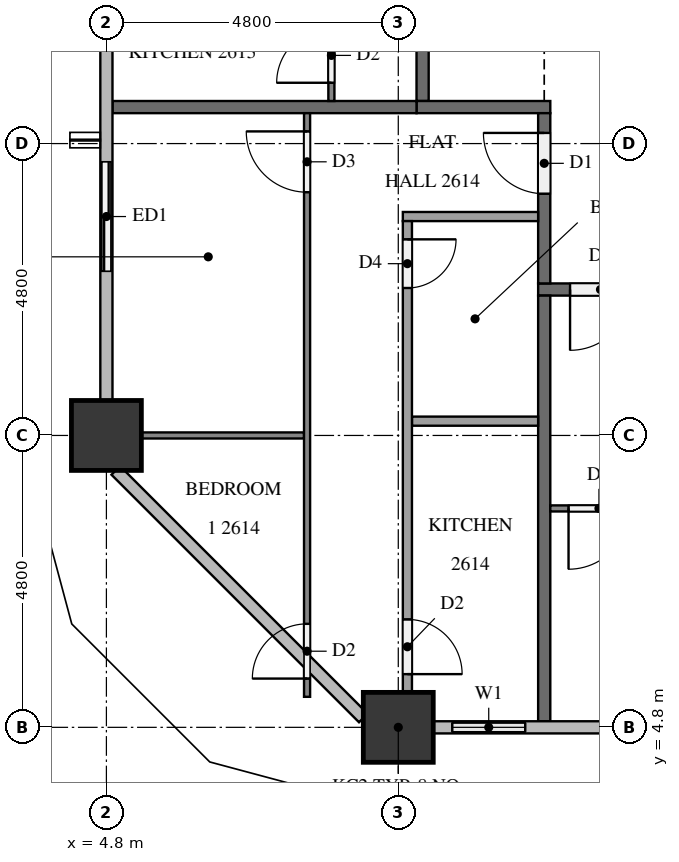
"""IFC4 building model, lengths in metres.
Left out: names, types, materials, properties, quantities, classifications, styles, units other than length and angle.
Written with IfcOpenShell. Run it as: python <this file> out.ifc"""

import sys

from ifc_helpers import new_model, si_unit, direction, frame, frame_2d, origin, origin_2d, place, context, subcontext, project, spatial, rectangle, extrude, element, fill, save


model = new_model("IFC4")
c1 = context("Model", 3, precision=1e-05, world=origin(), true_north=direction((0.0, 1.0)))
c2 = subcontext(c1, "Body", "Model", "MODEL_VIEW")
j1 = project(units=[si_unit("LENGTHUNIT", "METRE"), si_unit("PLANEANGLEUNIT", "RADIAN")], contexts=[c1])
p1 = place(None, origin())
s1 = spatial("IfcSite", under=j1, at=p1, CompositionType="ELEMENT")
p2 = place(p1, origin())
s2 = spatial("IfcBuilding", under=s1, at=p2, CompositionType="ELEMENT")
p3 = place(p2, frame((0.0, 0.0, 103.2)))
s3 = spatial("IfcBuildingStorey", under=s2, at=p3, CompositionType="ELEMENT", Elevation=103.2)
for number, where, z_axis, x_axis in (
    (1, (9.6, 4.8, 0.0), (0.0, 0.0, 1.0), (1.0, 0.0, 0.0)),
    (2, (4.8, 9.6, 0.0), (0.0, 0.0, 1.0), (1.0, 0.0, 0.0)),
):
    element("IfcColumn", number, at=place(p3, frame(where, z_axis=z_axis, x_axis=x_axis)), inside=s3, PredefinedType="COLUMN", context=c2, shape_type="SweptSolid", body=[
        extrude(rectangle(XDim=1.15, YDim=1.15, at=origin_2d()), origin(), (0.0, 0.0, 1.0), 3.2),
    ])
p4 = place(p3, frame((10.175, 4.8, 0.0), z_axis=(0.0, 0.0, 1.0), x_axis=(1.0, 0.0, 0.0)))
e3 = element("IfcWall", 3, at=p4, inside=s3, PredefinedType="SOLIDWALL", context=c2, shape_type="SweptSolid", body=[
    extrude(rectangle(XDim=1.825, YDim=0.15, at=frame_2d((0.913, 0.0))), origin(), (0.0, 0.0, 1.0), 3.2),
])
p5 = place(p4, frame((0.312, 0.0, 0.9)))
e4 = element("IfcOpeningElement", 4, at=p5, cuts=e3, PredefinedType="OPENING", context=c2, shape_type="SweptSolid", body=[
    extrude(rectangle(XDim=1.2, YDim=1.4, at=frame_2d((0.6, 0.7))), frame((0.0, 0.085, 0.0), z_axis=(0.0, -1.0, 0.0), x_axis=(1.0, 0.0, 0.0)), (0.0, 0.0, 1.0), 0.17),
])
p6 = place(p3, frame((4.8, 14.4, 0.0), z_axis=(0.0, 0.0, 1.0), x_axis=(0.0, -1.0, 0.0)))
e5 = element("IfcWall", 5, at=p6, inside=s3, PredefinedType="SOLIDWALL", context=c2, shape_type="SweptSolid", body=[
    extrude(rectangle(XDim=2.4, YDim=0.15, at=frame_2d((1.2, 0.0))), origin(), (0.0, 0.0, 1.0), 3.2),
])
p7 = place(p6, frame((0.3, 0.0, 0.0)))
e6 = element("IfcOpeningElement", 6, at=p7, cuts=e5, PredefinedType="OPENING", context=c2, shape_type="SweptSolid", body=[
    extrude(rectangle(XDim=1.8, YDim=2.4, at=frame_2d((0.9, 1.2))), frame((0.0, 0.085, 0.0), z_axis=(0.0, -1.0, 0.0), x_axis=(1.0, 0.0, 0.0)), (0.0, 0.0, 1.0), 0.17),
])
p8 = place(p3, frame((50.5, 12.0, 0.0), z_axis=(0.0, 0.0, 1.0), x_axis=(-1.0, 0.0, 0.0)))
e7 = element("IfcWall", 7, at=p8, inside=s3, PredefinedType="PARTITIONING", context=c2, shape_type="SweptSolid", body=[
    extrude(rectangle(XDim=38.6, YDim=0.2, at=frame_2d((19.3, 0.0))), origin(), (0.0, 0.0, 1.0), 3.2),
])
p9 = place(p8, frame((37.075, 0.0, 0.0)))
e8 = element("IfcOpeningElement", 8, at=p9, cuts=e7, PredefinedType="OPENING", context=c2, shape_type="SweptSolid", body=[
    extrude(rectangle(XDim=1.0, YDim=2.1, at=frame_2d((0.5, 1.05))), frame((0.0, 0.11, 0.0), z_axis=(0.0, -1.0, 0.0), x_axis=(1.0, 0.0, 0.0)), (0.0, 0.0, 1.0), 0.22),
])
p10 = place(p8, frame((22.675, 0.0, 0.0)))
e9 = element("IfcOpeningElement", 9, at=p10, cuts=e7, PredefinedType="OPENING", context=c2, shape_type="SweptSolid", body=[
    extrude(rectangle(XDim=1.0, YDim=2.1, at=frame_2d((0.5, 1.05))), frame((0.0, 0.11, 0.0), z_axis=(0.0, -1.0, 0.0), x_axis=(1.0, 0.0, 0.0)), (0.0, 0.0, 1.0), 0.22),
])
p11 = place(p8, frame((0.525, 0.0, 0.0)))
e10 = element("IfcOpeningElement", 10, at=p11, cuts=e7, PredefinedType="OPENING", context=c2, shape_type="SweptSolid", body=[
    extrude(rectangle(XDim=1.0, YDim=2.1, at=frame_2d((0.5, 1.05))), frame((0.0, 0.11, 0.0), z_axis=(0.0, -1.0, 0.0), x_axis=(1.0, 0.0, 0.0)), (0.0, 0.0, 1.0), 0.22),
])
p12 = place(p3, frame((10.0, 15.1, 0.0), z_axis=(0.0, 0.0, 1.0), x_axis=(0.0, 1.0, 0.0)))
e11 = element("IfcWall", 11, at=p12, inside=s3, PredefinedType="PARTITIONING", context=c2, shape_type="SweptSolid", body=[
    extrude(rectangle(XDim=22.6, YDim=0.2, at=frame_2d((11.3, 0.0))), origin(), (0.0, 0.0, 1.0), 3.2),
])
p13 = place(p12, frame((21.275, 0.0, 0.0)))
e12 = element("IfcOpeningElement", 12, at=p13, cuts=e11, PredefinedType="OPENING", context=c2, shape_type="SweptSolid", body=[
    extrude(rectangle(XDim=1.0, YDim=2.1, at=frame_2d((0.5, 1.05))), frame((0.0, 0.11, 0.0), z_axis=(0.0, -1.0, 0.0), x_axis=(1.0, 0.0, 0.0)), (0.0, 0.0, 1.0), 0.22),
])
p14 = place(p12, frame((7.475, 0.0, 0.0)))
e13 = element("IfcOpeningElement", 13, at=p14, cuts=e11, PredefinedType="OPENING", context=c2, shape_type="SweptSolid", body=[
    extrude(rectangle(XDim=1.0, YDim=2.1, at=frame_2d((0.5, 1.05))), frame((0.0, 0.11, 0.0), z_axis=(0.0, -1.0, 0.0), x_axis=(1.0, 0.0, 0.0)), (0.0, 0.0, 1.0), 0.22),
])
p15 = place(p3, frame((9.9, 15.0, 0.0), z_axis=(0.0, 0.0, 1.0), x_axis=(1.0, 0.0, 0.0)))
e14 = element("IfcWall", 14, at=p15, inside=s3, PredefinedType="PARTITIONING", context=c2, shape_type="SweptSolid", body=[
    extrude(rectangle(XDim=2.2, YDim=0.2, at=frame_2d((1.1, 0.0))), origin(), (0.0, 0.0, 1.0), 3.2),
])
p16 = place(p3, frame((12.0, 12.1, 0.0), z_axis=(0.0, 0.0, 1.0), x_axis=(0.0, 1.0, 0.0)))
e15 = element("IfcWall", 15, at=p16, inside=s3, PredefinedType="PARTITIONING", context=c2, shape_type="SweptSolid", body=[
    extrude(rectangle(XDim=2.8, YDim=0.2, at=frame_2d((1.4, 0.0))), origin(), (0.0, 0.0, 1.0), 3.2),
])
p17 = place(p16, frame((1.475, 0.0, 0.0)))
e16 = element("IfcOpeningElement", 16, at=p17, cuts=e15, PredefinedType="OPENING", context=c2, shape_type="SweptSolid", body=[
    extrude(rectangle(XDim=1.0, YDim=2.1, at=frame_2d((0.5, 1.05))), frame((0.0, 0.11, 0.0), z_axis=(0.0, -1.0, 0.0), x_axis=(1.0, 0.0, 0.0)), (0.0, 0.0, 1.0), 0.22),
])
p18 = place(p3, frame((12.0, 4.9, 0.0), z_axis=(0.0, 0.0, 1.0), x_axis=(0.0, 1.0, 0.0)))
e17 = element("IfcWall", 17, at=p18, inside=s3, PredefinedType="PARTITIONING", context=c2, shape_type="SweptSolid", body=[
    extrude(rectangle(XDim=7.0, YDim=0.2, at=frame_2d((3.5, 0.0))), origin(), (0.0, 0.0, 1.0), 3.2),
])
p19 = place(p3, frame((4.9, 15.0, 0.0), z_axis=(0.0, 0.0, 1.0), x_axis=(1.0, 0.0, 0.0)))
e18 = element("IfcWall", 18, at=p19, inside=s3, PredefinedType="PARTITIONING", context=c2, shape_type="SweptSolid", body=[
    extrude(rectangle(XDim=5.0, YDim=0.2, at=frame_2d((2.5, 0.0))), origin(), (0.0, 0.0, 1.0), 3.2),
])
p20 = place(p3, frame((26.3, 8.4, 0.0), z_axis=(0.0, 0.0, 1.0), x_axis=(-1.0, 0.0, 0.0)))
e19 = element("IfcWall", 19, at=p20, inside=s3, PredefinedType="PARTITIONING", context=c2, shape_type="SweptSolid", body=[
    extrude(rectangle(XDim=14.2, YDim=0.1, at=frame_2d((7.1, 0.0))), origin(), (0.0, 0.0, 1.0), 3.2),
])
p21 = place(p20, frame((12.9, 0.0, 0.0)))
e20 = element("IfcOpeningElement", 20, at=p21, cuts=e19, PredefinedType="OPENING", context=c2, shape_type="SweptSolid", body=[
    extrude(rectangle(XDim=1.0, YDim=2.1, at=frame_2d((0.5, 1.05))), frame((0.0, 0.06, 0.0), z_axis=(0.0, -1.0, 0.0), x_axis=(1.0, 0.0, 0.0)), (0.0, 0.0, 1.0), 0.12),
])
p22 = place(p20, frame((5.05, 0.0, 0.0)))
e21 = element("IfcOpeningElement", 21, at=p22, cuts=e19, PredefinedType="OPENING", context=c2, shape_type="SweptSolid", body=[
    extrude(rectangle(XDim=0.9, YDim=2.1, at=frame_2d((0.45, 1.05))), frame((0.0, 0.06, 0.0), z_axis=(0.0, -1.0, 0.0), x_axis=(1.0, 0.0, 0.0)), (0.0, 0.0, 1.0), 0.12),
])
p23 = place(p20, frame((3.45, 0.0, 0.0)))
e22 = element("IfcOpeningElement", 22, at=p23, cuts=e19, PredefinedType="OPENING", context=c2, shape_type="SweptSolid", body=[
    extrude(rectangle(XDim=0.9, YDim=2.1, at=frame_2d((0.45, 1.05))), frame((0.0, 0.06, 0.0), z_axis=(0.0, -1.0, 0.0), x_axis=(1.0, 0.0, 0.0)), (0.0, 0.0, 1.0), 0.12),
])
p24 = place(p3, frame((8.5, 15.1, 0.0), z_axis=(0.0, 0.0, 1.0), x_axis=(0.0, 1.0, 0.0)))
e23 = element("IfcWall", 23, at=p24, inside=s3, PredefinedType="PARTITIONING", context=c2, shape_type="SweptSolid", body=[
    extrude(rectangle(XDim=8.8, YDim=0.1, at=frame_2d((4.4, 0.0))), origin(), (0.0, 0.0, 1.0), 3.2),
])
p25 = place(p24, frame((4.45, 0.0, 0.0)))
e24 = element("IfcOpeningElement", 24, at=p25, cuts=e23, PredefinedType="OPENING", context=c2, shape_type="SweptSolid", body=[
    extrude(rectangle(XDim=1.0, YDim=2.1, at=frame_2d((0.5, 1.05))), frame((0.0, 0.06, 0.0), z_axis=(0.0, -1.0, 0.0), x_axis=(1.0, 0.0, 0.0)), (0.0, 0.0, 1.0), 0.12),
])
p26 = place(p24, frame((2.95, 0.0, 0.0)))
e25 = element("IfcOpeningElement", 25, at=p26, cuts=e23, PredefinedType="OPENING", context=c2, shape_type="SweptSolid", body=[
    extrude(rectangle(XDim=0.8, YDim=2.1, at=frame_2d((0.4, 1.05))), frame((0.0, 0.06, 0.0), z_axis=(0.0, -1.0, 0.0), x_axis=(1.0, 0.0, 0.0)), (0.0, 0.0, 1.0), 0.12),
])
p27 = place(p24, frame((0.3, 0.0, 0.0)))
e26 = element("IfcOpeningElement", 26, at=p27, cuts=e23, PredefinedType="OPENING", context=c2, shape_type="SweptSolid", body=[
    extrude(rectangle(XDim=0.9, YDim=2.1, at=frame_2d((0.45, 1.05))), frame((0.0, 0.06, 0.0), z_axis=(0.0, -1.0, 0.0), x_axis=(1.0, 0.0, 0.0)), (0.0, 0.0, 1.0), 0.12),
])
p28 = place(p3, frame((8.05, 9.6, 0.0), z_axis=(0.0, 0.0, 1.0), x_axis=(-1.0, 0.0, 0.0)))
e27 = element("IfcWall", 27, at=p28, inside=s3, PredefinedType="PARTITIONING", context=c2, shape_type="SweptSolid", body=[
    extrude(rectangle(XDim=2.675, YDim=0.1, at=frame_2d((1.337, 0.0))), origin(), (0.0, 0.0, 1.0), 3.2),
])
p29 = place(p3, frame((8.1, 5.302, 0.0), z_axis=(0.0, 0.0, 1.0), x_axis=(0.0, 1.0, 0.0)))
e28 = element("IfcWall", 28, at=p29, inside=s3, PredefinedType="PARTITIONING", context=c2, shape_type="SweptSolid", body=[
    extrude(rectangle(XDim=9.598, YDim=0.1, at=frame_2d((4.799, 0.0))), origin(), (0.0, 0.0, 1.0), 3.2),
])
p30 = place(p29, frame((8.298, 0.0, 0.0)))
e29 = element("IfcOpeningElement", 29, at=p30, cuts=e28, PredefinedType="OPENING", context=c2, shape_type="SweptSolid", body=[
    extrude(rectangle(XDim=1.0, YDim=2.1, at=frame_2d((0.5, 1.05))), frame((0.0, 0.06, 0.0), z_axis=(0.0, -1.0, 0.0), x_axis=(1.0, 0.0, 0.0)), (0.0, 0.0, 1.0), 0.12),
])
p31 = place(p29, frame((0.3, 0.0, 0.0)))
e30 = element("IfcOpeningElement", 30, at=p31, cuts=e28, PredefinedType="OPENING", context=c2, shape_type="SweptSolid", body=[
    extrude(rectangle(XDim=0.9, YDim=2.1, at=frame_2d((0.45, 1.05))), frame((0.0, 0.06, 0.0), z_axis=(0.0, -1.0, 0.0), x_axis=(1.0, 0.0, 0.0)), (0.0, 0.0, 1.0), 0.12),
])
p32 = place(p3, frame((11.9, 9.835, 0.0), z_axis=(0.0, 0.0, 1.0), x_axis=(-1.0, 0.0, 0.0)))
e31 = element("IfcWall", 31, at=p32, inside=s3, PredefinedType="PARTITIONING", context=c2, shape_type="SweptSolid", body=[
    extrude(rectangle(XDim=2.075, YDim=0.15, at=frame_2d((1.038, 0.0))), origin(), (0.0, 0.0, 1.0), 3.2),
])
p33 = place(p3, frame((11.9, 13.2, 0.0), z_axis=(0.0, 0.0, 1.0), x_axis=(-1.0, 0.0, 0.0)))
e32 = element("IfcWall", 32, at=p33, inside=s3, PredefinedType="PARTITIONING", context=c2, shape_type="SweptSolid", body=[
    extrude(rectangle(XDim=2.225, YDim=0.15, at=frame_2d((1.112, 0.0))), origin(), (0.0, 0.0, 1.0), 3.2),
])
p34 = place(p3, frame((9.75, 13.125, 0.0), z_axis=(0.0, 0.0, 1.0), x_axis=(0.0, -1.0, 0.0)))
e33 = element("IfcWall", 33, at=p34, inside=s3, PredefinedType="PARTITIONING", context=c2, shape_type="SweptSolid", body=[
    extrude(rectangle(XDim=7.75, YDim=0.15, at=frame_2d((3.875, 0.0))), origin(), (0.0, 0.0, 1.0), 3.2),
])
p35 = place(p34, frame((0.3, 0.0, 0.0)))
e34 = element("IfcOpeningElement", 34, at=p35, cuts=e33, PredefinedType="OPENING", context=c2, shape_type="SweptSolid", body=[
    extrude(rectangle(XDim=0.8, YDim=2.1, at=frame_2d((0.4, 1.05))), frame((0.0, 0.085, 0.0), z_axis=(0.0, -1.0, 0.0), x_axis=(1.0, 0.0, 0.0)), (0.0, 0.0, 1.0), 0.17),
])
p36 = place(p34, frame((6.55, 0.0, 0.0)))
e35 = element("IfcOpeningElement", 35, at=p36, cuts=e33, PredefinedType="OPENING", context=c2, shape_type="SweptSolid", body=[
    extrude(rectangle(XDim=0.9, YDim=2.1, at=frame_2d((0.45, 1.05))), frame((0.0, 0.085, 0.0), z_axis=(0.0, -1.0, 0.0), x_axis=(1.0, 0.0, 0.0)), (0.0, 0.0, 1.0), 0.17),
])
p37 = place(p5, origin())
e36 = element("IfcWindow", 36, at=p37, inside=s3, PartitioningType="SINGLE_PANEL", PredefinedType="WINDOW", context=c2, shape_type="SweptSolid", body=[
    extrude(rectangle(XDim=1.2, YDim=1.4, at=frame_2d((0.6, 0.7))), frame((0.0, 0.03, 0.0), z_axis=(0.0, -1.0, 0.0), x_axis=(1.0, 0.0, 0.0)), (0.0, 0.0, 1.0), 0.06),
])
fill(e4, e36)
p38 = place(p7, origin())
e37 = element("IfcDoor", 37, at=p38, inside=s3, OperationType="SLIDING_TO_RIGHT", PredefinedType="DOOR", context=c2, shape_type="SweptSolid", body=[
    extrude(rectangle(XDim=1.8, YDim=2.4, at=frame_2d((0.9, 1.2))), frame((0.0, 0.025, 0.0), z_axis=(0.0, -1.0, 0.0), x_axis=(1.0, 0.0, 0.0)), (0.0, 0.0, 1.0), 0.05),
])
fill(e6, e37)
p39 = place(p9, origin())
e38 = element("IfcDoor", 38, at=p39, inside=s3, OperationType="SINGLE_SWING_RIGHT", PredefinedType="DOOR", context=c2, shape_type="SweptSolid", body=[
    extrude(rectangle(XDim=1.0, YDim=2.1, at=frame_2d((0.5, 1.05))), frame((0.0, 0.025, 0.0), z_axis=(0.0, -1.0, 0.0), x_axis=(1.0, 0.0, 0.0)), (0.0, 0.0, 1.0), 0.05),
])
fill(e8, e38)
p40 = place(p17, origin())
e39 = element("IfcDoor", 39, at=p40, inside=s3, OperationType="SINGLE_SWING_RIGHT", PredefinedType="DOOR", context=c2, shape_type="SweptSolid", body=[
    extrude(rectangle(XDim=1.0, YDim=2.1, at=frame_2d((0.5, 1.05))), frame((0.0, 0.025, 0.0), z_axis=(0.0, -1.0, 0.0), x_axis=(1.0, 0.0, 0.0)), (0.0, 0.0, 1.0), 0.05),
])
fill(e16, e39)
p41 = place(p21, origin())
e40 = element("IfcDoor", 40, at=p41, inside=s3, OperationType="SINGLE_SWING_RIGHT", PredefinedType="DOOR", context=c2, shape_type="SweptSolid", body=[
    extrude(rectangle(XDim=1.0, YDim=2.1, at=frame_2d((0.5, 1.05))), frame((0.0, 0.025, 0.0), z_axis=(0.0, -1.0, 0.0), x_axis=(1.0, 0.0, 0.0)), (0.0, 0.0, 1.0), 0.05),
])
fill(e20, e40)
p42 = place(p27, origin())
e41 = element("IfcDoor", 41, at=p42, inside=s3, OperationType="SINGLE_SWING_LEFT", PredefinedType="DOOR", context=c2, shape_type="SweptSolid", body=[
    extrude(rectangle(XDim=0.9, YDim=2.1, at=frame_2d((0.45, 1.05))), frame((0.0, 0.025, 0.0), z_axis=(0.0, -1.0, 0.0), x_axis=(1.0, 0.0, 0.0)), (0.0, 0.0, 1.0), 0.05),
])
fill(e26, e41)
p43 = place(p30, origin())
e42 = element("IfcDoor", 42, at=p43, inside=s3, OperationType="SINGLE_SWING_RIGHT", PredefinedType="DOOR", context=c2, shape_type="SweptSolid", body=[
    extrude(rectangle(XDim=1.0, YDim=2.1, at=frame_2d((0.5, 1.05))), frame((0.0, 0.025, 0.0), z_axis=(0.0, -1.0, 0.0), x_axis=(1.0, 0.0, 0.0)), (0.0, 0.0, 1.0), 0.05),
])
fill(e29, e42)
p44 = place(p31, origin())
e43 = element("IfcDoor", 43, at=p44, inside=s3, OperationType="SINGLE_SWING_LEFT", PredefinedType="DOOR", context=c2, shape_type="SweptSolid", body=[
    extrude(rectangle(XDim=0.9, YDim=2.1, at=frame_2d((0.45, 1.05))), frame((0.0, 0.025, 0.0), z_axis=(0.0, -1.0, 0.0), x_axis=(1.0, 0.0, 0.0)), (0.0, 0.0, 1.0), 0.05),
])
fill(e30, e43)
p45 = place(p35, origin())
e44 = element("IfcDoor", 44, at=p45, inside=s3, OperationType="SINGLE_SWING_LEFT", PredefinedType="DOOR", context=c2, shape_type="SweptSolid", body=[
    extrude(rectangle(XDim=0.8, YDim=2.1, at=frame_2d((0.4, 1.05))), frame((0.0, 0.025, 0.0), z_axis=(0.0, -1.0, 0.0), x_axis=(1.0, 0.0, 0.0)), (0.0, 0.0, 1.0), 0.05),
])
fill(e34, e44)
p46 = place(p36, origin())
e45 = element("IfcDoor", 45, at=p46, inside=s3, OperationType="SINGLE_SWING_RIGHT", PredefinedType="DOOR", context=c2, shape_type="SweptSolid", body=[
    extrude(rectangle(XDim=0.9, YDim=2.1, at=frame_2d((0.45, 1.05))), frame((0.0, 0.025, 0.0), z_axis=(0.0, -1.0, 0.0), x_axis=(1.0, 0.0, 0.0)), (0.0, 0.0, 1.0), 0.05),
])
fill(e35, e45)
save(model, sys.argv[1])
